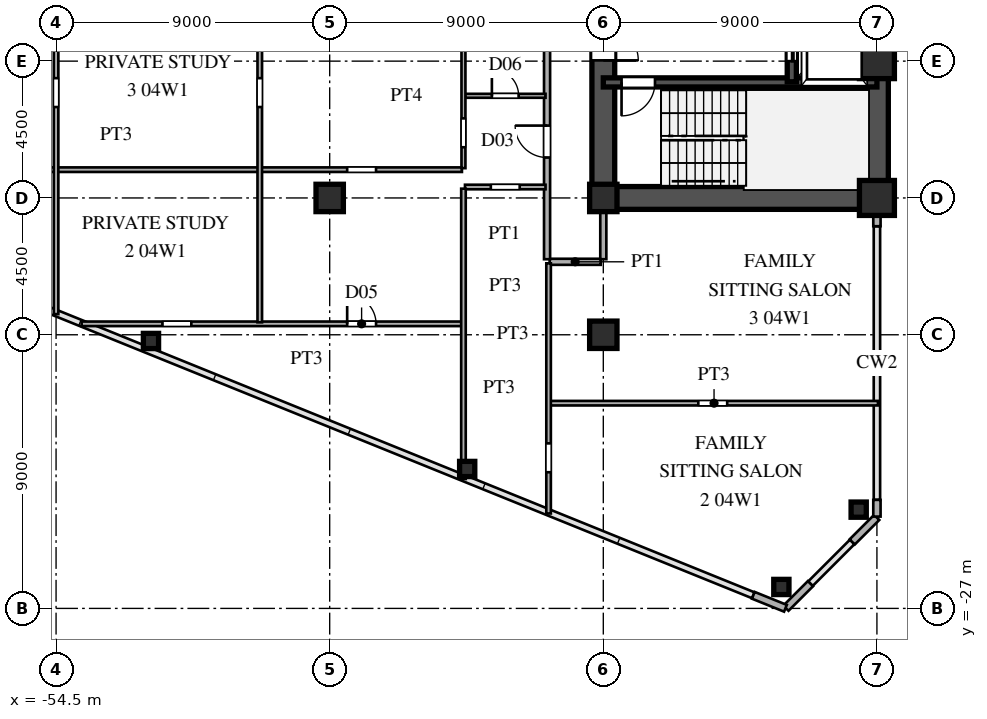
"""IFC4 building model, lengths in metres.
Left out: names, types, materials, properties, quantities, classifications, styles, units other than length and angle.
Written with IfcOpenShell. Run it as: python <this file> out.ifc"""

import sys

from ifc_helpers import new_model, si_unit, direction, frame, frame_2d, origin, origin_2d, place, context, subcontext, project, spatial, rectangle, hollow_rectangle, i_section, extrude, source, transform, mapped, element, fill, save


model = new_model("IFC4")
c1 = context("Model", 3, precision=1e-05, world=origin(), true_north=direction((0.0, 1.0)))
c2 = subcontext(c1, "Body", "Model", "MODEL_VIEW")
j1 = project(units=[si_unit("LENGTHUNIT", "METRE"), si_unit("PLANEANGLEUNIT", "RADIAN")], contexts=[c1])
p1 = place(None, origin())
s1 = spatial("IfcSite", under=j1, at=p1, CompositionType="ELEMENT")
p2 = place(p1, origin())
s2 = spatial("IfcBuilding", under=s1, at=p2, CompositionType="ELEMENT")
p3 = place(p2, frame((0.0, 0.0, 18.9)))
s3 = spatial("IfcBuildingStorey", under=s2, at=p3, CompositionType="ELEMENT", Elevation=18.9)
m1 = source(origin(), c2, "Body", "SweptSolid", [
    extrude(hollow_rectangle(XDim=1.15, YDim=1.15, WallThickness=0.048, at=origin_2d()), origin(), (0.0, 0.0, 1.0), 3.6),
])
for number, where, z_axis, x_axis in (
    (1, (-27.5, -13.5, 0.0), (0.0, 0.0, 1.0), (1.0, 0.0, 0.0)),
    (2, (-27.5, -9.0, 0.0), (0.0, 0.0, 1.0), (1.0, 0.0, 0.0)),
):
    element("IfcColumn", number, at=place(p3, frame(where, z_axis=z_axis, x_axis=x_axis)), inside=s3, PredefinedType="COLUMN", context=c2, shape_type="MappedRepresentation", body=[
        mapped(m1, transform((0.0, 0.0, 0.0), scale=1.0)),
    ])
m2 = source(origin(), c2, "Body", "SweptSolid", [
    extrude(i_section(OverallWidth=0.9, OverallDepth=0.9, WebThickness=0.036, FlangeThickness=0.055, at=origin_2d()), origin(), (0.0, 0.0, 1.0), 3.6),
])
for number, where, z_axis, x_axis in (
    (3, (-36.5, -18.0, 0.0), (0.0, 0.0, 1.0), (1.0, 0.0, 0.0)),
    (4, (-36.5, -13.5, 0.0), (0.0, 0.0, 1.0), (1.0, 0.0, 0.0)),
    (5, (-45.5, -13.5, 0.0), (0.0, 0.0, 1.0), (1.0, 0.0, 0.0)),
):
    element("IfcColumn", number, at=place(p3, frame(where, z_axis=z_axis, x_axis=x_axis)), inside=s3, PredefinedType="COLUMN", context=c2, shape_type="MappedRepresentation", body=[
        mapped(m2, transform((0.0, 0.0, 0.0), scale=1.0)),
    ])
m3 = source(origin(), c2, "Body", "SweptSolid", [
    extrude(hollow_rectangle(XDim=0.5, YDim=0.5, WallThickness=0.02, at=origin_2d()), origin(), (0.0, 0.0, 1.0), 3.6),
])
for number, where, z_axis, x_axis in (
    (6, (-28.1, -23.751, 0.0), (0.0, 0.0, 1.0), (1.0, 0.0, 0.0)),
    (7, (-30.643, -26.295, 0.0), (0.0, 0.0, 1.0), (1.0, 0.0, 0.0)),
    (8, (-40.977, -22.414, 0.0), (0.0, 0.0, 1.0), (1.0, 0.0, 0.0)),
    (9, (-51.378, -18.204, 0.0), (0.0, 0.0, 1.0), (1.0, 0.0, 0.0)),
):
    element("IfcColumn", number, at=place(p3, frame(where, z_axis=z_axis, x_axis=x_axis)), inside=s3, PredefinedType="COLUMN", context=c2, shape_type="MappedRepresentation", body=[
        mapped(m3, transform((0.0, 0.0, 0.0), scale=1.0)),
    ])
p4 = place(p3, frame((-27.5, -23.98, 0.0), z_axis=(0.0, 0.0, 1.0), x_axis=(0.0, 1.0, 0.0)))
e10 = element("IfcWall", 10, at=p4, inside=s3, PredefinedType="SOLIDWALL", context=c2, shape_type="SweptSolid", body=[
    extrude(rectangle(XDim=0.55, YDim=0.24, at=frame_2d((0.275, 0.0))), origin(), (0.0, 0.0, 1.0), 3.38),
])
p5 = place(p3, frame((-27.5, -14.43, 0.0), z_axis=(0.0, 0.0, 1.0), x_axis=(0.0, 1.0, 0.0)))
e11 = element("IfcWall", 11, at=p5, inside=s3, PredefinedType="SOLIDWALL", context=c2, shape_type="SweptSolid", body=[
    extrude(rectangle(XDim=0.55, YDim=0.24, at=frame_2d((0.275, 0.0))), origin(), (0.0, 0.0, 1.0), 2.88),
])
p6 = place(p3, frame((-31.566, -26.569, 0.0), z_axis=(0.0, 0.0, 1.0), x_axis=(0.927007103665, -0.375043770452, 0.0)))
e12 = element("IfcWall", 12, at=p6, inside=s3, PredefinedType="SOLIDWALL", context=c2, shape_type="SweptSolid", body=[
    extrude(rectangle(XDim=1.14, YDim=0.24, at=frame_2d((0.57, 0.0))), origin(), (0.0, 0.0, 1.0), 3.38),
])
for number, where, z_axis, x_axis in (
    (13, (-30.493, -26.993, 0.0), (0.0, 0.0, 1.0), (0.707, 0.707, 0.0)),
    (14, (-28.313, -24.813, 0.0), (0.0, 0.0, 1.0), (0.707, 0.707, 0.0)),
):
    element("IfcWall", number, at=place(p3, frame(where, z_axis=z_axis, x_axis=x_axis)), inside=s3, PredefinedType="SOLIDWALL", context=c2, shape_type="SweptSolid", body=[
        extrude(rectangle(XDim=1.14, YDim=0.24, at=frame_2d((0.57, 0.0))), origin(), (0.0, 0.0, 1.0), 3.38),
    ])
p7 = place(p3, frame((-27.5, -13.5, 0.0), z_axis=(0.0, 0.0, 1.0), x_axis=(0.0, 1.0, 0.0)))
e15 = element("IfcWall", 15, at=p7, inside=s3, PredefinedType="SHEAR", context=c2, shape_type="SweptSolid", body=[
    extrude(rectangle(XDim=12.2, YDim=0.75, at=frame_2d((6.1, 0.0))), origin(), (0.0, 0.0, 1.0), 3.38),
])
p8 = place(p3, frame((-36.5, -13.5, 0.0), z_axis=(0.0, 0.0, 1.0), x_axis=(1.0, 0.0, 0.0)))
e16 = element("IfcWall", 16, at=p8, inside=s3, PredefinedType="SHEAR", context=c2, shape_type="SweptSolid", body=[
    extrude(rectangle(XDim=9.0, YDim=0.75, at=frame_2d((4.5, 0.0))), origin(), (0.0, 0.0, 1.0), 3.38),
])
p9 = place(p3, frame((-36.5, -13.65, 0.0), z_axis=(0.0, 0.0, 1.0), x_axis=(0.0, 1.0, 0.0)))
e17 = element("IfcWall", 17, at=p9, inside=s3, PredefinedType="SHEAR", context=c2, shape_type="SweptSolid", body=[
    extrude(rectangle(XDim=7.15, YDim=0.75, at=frame_2d((3.575, 0.0))), origin(), (0.0, 0.0, 1.0), 3.38),
])
p10 = place(p9, frame((4.675, 0.0, 0.0)))
e18 = element("IfcOpeningElement", 18, at=p10, cuts=e17, PredefinedType="OPENING", context=c2, shape_type="SweptSolid", body=[
    extrude(rectangle(XDim=1.15, YDim=2.2, at=frame_2d((0.575, 1.1))), frame((0.0, 0.385, 0.0), z_axis=(0.0, -1.0, 0.0), x_axis=(1.0, 0.0, 0.0)), (0.0, 0.0, 1.0), 0.77),
])
p11 = place(p3, frame((-36.5, -9.7, 0.0), z_axis=(0.0, 0.0, 1.0), x_axis=(1.0, 0.0, 0.0)))
e19 = element("IfcWall", 19, at=p11, inside=s3, PredefinedType="SHEAR", context=c2, shape_type="SweptSolid", body=[
    extrude(rectangle(XDim=9.0, YDim=0.3, at=frame_2d((4.5, 0.0))), origin(), (0.0, 0.0, 1.0), 3.38),
])
p12 = place(p11, frame((0.6, 0.0, 0.0)))
e20 = element("IfcOpeningElement", 20, at=p12, cuts=e19, PredefinedType="OPENING", context=c2, shape_type="SweptSolid", body=[
    extrude(rectangle(XDim=1.1, YDim=2.2, at=frame_2d((0.55, 1.1))), frame((0.0, 0.16, 0.0), z_axis=(0.0, -1.0, 0.0), x_axis=(1.0, 0.0, 0.0)), (0.0, 0.0, 1.0), 0.32),
])
p13 = place(p3, frame((-30.3, -9.68, 0.0), z_axis=(0.0, 0.0, 1.0), x_axis=(0.0, 1.0, 0.0)))
e21 = element("IfcWall", 21, at=p13, inside=s3, PredefinedType="SHEAR", context=c2, shape_type="SweptSolid", body=[
    extrude(rectangle(XDim=2.56, YDim=0.3, at=frame_2d((1.28, 0.0))), origin(), (0.0, 0.0, 1.0), 3.38),
])
p14 = place(p13, frame((0.68, 0.0, 0.0)))
e22 = element("IfcOpeningElement", 22, at=p14, cuts=e21, PredefinedType="OPENING", context=c2, shape_type="SweptSolid", body=[
    extrude(rectangle(XDim=1.2, YDim=2.25, at=frame_2d((0.6, 1.125))), frame((0.0, 0.16, 0.0), z_axis=(0.0, -1.0, 0.0), x_axis=(1.0, 0.0, 0.0)), (0.0, 0.0, 1.0), 0.32),
])
p15 = place(p3, frame((-38.25, -20.25, 0.0), z_axis=(0.0, 0.0, 1.0), x_axis=(1.0, 0.0, 0.0)))
e23 = element("IfcWall", 23, at=p15, inside=s3, PredefinedType="PARTITIONING", context=c2, shape_type="SweptSolid", body=[
    extrude(rectangle(XDim=10.785, YDim=0.15, at=frame_2d((5.393, 0.0))), origin(), (0.0, 0.0, 1.0), 3.38),
])
p16 = place(p15, frame((4.875, 0.0, 0.0)))
e24 = element("IfcOpeningElement", 24, at=p16, cuts=e23, PredefinedType="OPENING", context=c2, shape_type="SweptSolid", body=[
    extrude(rectangle(XDim=0.95, YDim=2.15, at=frame_2d((0.475, 1.075))), frame((0.0, 0.085, 0.0), z_axis=(0.0, -1.0, 0.0), x_axis=(1.0, 0.0, 0.0)), (0.0, 0.0, 1.0), 0.17),
])
p17 = place(p3, frame((-53.66, -17.64, 0.0), z_axis=(0.0, 0.0, 1.0), x_axis=(1.0, 0.0, 0.0)))
e25 = element("IfcWall", 25, at=p17, inside=s3, PredefinedType="PARTITIONING", context=c2, shape_type="SweptSolid", body=[
    extrude(rectangle(XDim=12.51, YDim=0.15, at=frame_2d((6.255, 0.0))), origin(), (0.0, 0.0, 1.0), 3.38),
])
p18 = place(p17, frame((8.735, 0.0, 0.0)))
e26 = element("IfcOpeningElement", 26, at=p18, cuts=e25, PredefinedType="OPENING", context=c2, shape_type="SweptSolid", body=[
    extrude(rectangle(XDim=0.95, YDim=2.15, at=frame_2d((0.475, 1.075))), frame((0.0, 0.085, 0.0), z_axis=(0.0, -1.0, 0.0), x_axis=(1.0, 0.0, 0.0)), (0.0, 0.0, 1.0), 0.17),
])
p19 = place(p17, frame((2.659, 0.0, 0.0)))
e27 = element("IfcOpeningElement", 27, at=p19, cuts=e25, PredefinedType="OPENING", context=c2, shape_type="SweptSolid", body=[
    extrude(rectangle(XDim=0.95, YDim=2.15, at=frame_2d((0.475, 1.075))), frame((0.0, 0.085, 0.0), z_axis=(0.0, -1.0, 0.0), x_axis=(1.0, 0.0, 0.0)), (0.0, 0.0, 1.0), 0.17),
])
p20 = place(p3, frame((-38.265, -15.6, 0.0), z_axis=(0.0, 0.0, 1.0), x_axis=(1.0, 0.0, 0.0)))
e28 = element("IfcWall", 28, at=p20, inside=s3, PredefinedType="PARTITIONING", context=c2, shape_type="SweptSolid", body=[
    extrude(rectangle(XDim=1.68, YDim=0.2, at=frame_2d((0.84, 0.0))), origin(), (0.0, 0.0, 1.0), 3.38),
])
p21 = place(p3, frame((-41.05, -13.14, 0.0), z_axis=(0.0, 0.0, 1.0), x_axis=(1.0, 0.0, 0.0)))
e29 = element("IfcWall", 29, at=p21, inside=s3, PredefinedType="PARTITIONING", context=c2, shape_type="SweptSolid", body=[
    extrude(rectangle(XDim=2.65, YDim=0.15, at=frame_2d((1.325, 0.0))), origin(), (0.0, 0.0, 1.0), 3.38),
])
p22 = place(p21, frame((0.85, 0.0, 0.0)))
e30 = element("IfcOpeningElement", 30, at=p22, cuts=e29, PredefinedType="OPENING", context=c2, shape_type="SweptSolid", body=[
    extrude(rectangle(XDim=0.95, YDim=2.15, at=frame_2d((0.475, 1.075))), frame((0.0, 0.085, 0.0), z_axis=(0.0, -1.0, 0.0), x_axis=(1.0, 0.0, 0.0)), (0.0, 0.0, 1.0), 0.17),
])
p23 = place(p3, frame((-66.186, -12.57, 0.0), z_axis=(0.0, 0.0, 1.0), x_axis=(1.0, 0.0, 0.0)))
e31 = element("IfcWall", 31, at=p23, inside=s3, PredefinedType="PARTITIONING", context=c2, shape_type="SweptSolid", body=[
    extrude(rectangle(XDim=25.036, YDim=0.15, at=frame_2d((12.518, 0.0))), origin(), (0.0, 0.0, 1.0), 3.38),
])
p24 = place(p23, frame((21.261, 0.0, 0.0)))
e32 = element("IfcOpeningElement", 32, at=p24, cuts=e31, PredefinedType="OPENING", context=c2, shape_type="SweptSolid", body=[
    extrude(rectangle(XDim=0.95, YDim=2.15, at=frame_2d((0.475, 1.075))), frame((0.0, 0.085, 0.0), z_axis=(0.0, -1.0, 0.0), x_axis=(1.0, 0.0, 0.0)), (0.0, 0.0, 1.0), 0.17),
])
p25 = place(p23, frame((8.361, 0.0, 0.0)))
e33 = element("IfcOpeningElement", 33, at=p25, cuts=e31, PredefinedType="OPENING", context=c2, shape_type="SweptSolid", body=[
    extrude(rectangle(XDim=0.95, YDim=2.15, at=frame_2d((0.475, 1.075))), frame((0.0, 0.085, 0.0), z_axis=(0.0, -1.0, 0.0), x_axis=(1.0, 0.0, 0.0)), (0.0, 0.0, 1.0), 0.17),
])
p26 = place(p3, frame((-41.05, -10.14, 0.0), z_axis=(0.0, 0.0, 1.0), x_axis=(1.0, 0.0, 0.0)))
e34 = element("IfcWall", 34, at=p26, inside=s3, PredefinedType="PARTITIONING", context=c2, shape_type="SweptSolid", body=[
    extrude(rectangle(XDim=2.65, YDim=0.13, at=frame_2d((1.325, 0.0))), origin(), (0.0, 0.0, 1.0), 3.38),
])
p27 = place(p26, frame((0.885, 0.0, 0.0)))
e35 = element("IfcOpeningElement", 35, at=p27, cuts=e34, PredefinedType="OPENING", context=c2, shape_type="SweptSolid", body=[
    extrude(rectangle(XDim=0.88, YDim=2.1, at=frame_2d((0.44, 1.05))), frame((0.0, 0.075, 0.0), z_axis=(0.0, -1.0, 0.0), x_axis=(1.0, 0.0, 0.0)), (0.0, 0.0, 1.0), 0.15),
])
p28 = place(p3, frame((-54.5, -17.321, 0.0), z_axis=(0.0, 0.0, 1.0), x_axis=(0.0, 1.0, 0.0)))
e36 = element("IfcWall", 36, at=p28, inside=s3, PredefinedType="PARTITIONING", context=c2, shape_type="SweptSolid", body=[
    extrude(rectangle(XDim=34.557, YDim=0.15, at=frame_2d((17.279, 0.0))), origin(), (0.0, 0.0, 1.0), 2.68),
])
p29 = place(p28, frame((6.811, 0.0, 0.0)))
e37 = element("IfcOpeningElement", 37, at=p29, cuts=e36, PredefinedType="OPENING", context=c2, shape_type="SweptSolid", body=[
    extrude(rectangle(XDim=0.95, YDim=2.15, at=frame_2d((0.475, 1.075))), frame((0.0, 0.085, 0.0), z_axis=(0.0, -1.0, 0.0), x_axis=(1.0, 0.0, 0.0)), (0.0, 0.0, 1.0), 0.17),
])
p30 = place(p28, frame((16.346, 0.0, 0.0)))
e38 = element("IfcOpeningElement", 38, at=p30, cuts=e36, PredefinedType="OPENING", context=c2, shape_type="SweptSolid", body=[
    extrude(rectangle(XDim=0.95, YDim=2.15, at=frame_2d((0.475, 1.075))), frame((0.0, 0.085, 0.0), z_axis=(0.0, -1.0, 0.0), x_axis=(1.0, 0.0, 0.0)), (0.0, 0.0, 1.0), 0.17),
])
p31 = place(p28, frame((11.312, 0.0, 0.0)))
e39 = element("IfcOpeningElement", 39, at=p31, cuts=e36, PredefinedType="OPENING", context=c2, shape_type="SweptSolid", body=[
    extrude(rectangle(XDim=0.95, YDim=2.15, at=frame_2d((0.475, 1.075))), frame((0.0, 0.085, 0.0), z_axis=(0.0, -1.0, 0.0), x_axis=(1.0, 0.0, 0.0)), (0.0, 0.0, 1.0), 0.17),
])
p32 = place(p28, frame((20.352, 0.0, 0.0)))
e40 = element("IfcOpeningElement", 40, at=p32, cuts=e36, PredefinedType="OPENING", context=c2, shape_type="SweptSolid", body=[
    extrude(rectangle(XDim=0.95, YDim=2.15, at=frame_2d((0.475, 1.075))), frame((0.0, 0.085, 0.0), z_axis=(0.0, -1.0, 0.0), x_axis=(1.0, 0.0, 0.0)), (0.0, 0.0, 1.0), 0.17),
])
p33 = place(p28, frame((26.048, 0.0, 0.0)))
e41 = element("IfcOpeningElement", 41, at=p33, cuts=e36, PredefinedType="OPENING", context=c2, shape_type="SweptSolid", body=[
    extrude(rectangle(XDim=0.95, YDim=2.15, at=frame_2d((0.475, 1.075))), frame((0.0, 0.085, 0.0), z_axis=(0.0, -1.0, 0.0), x_axis=(1.0, 0.0, 0.0)), (0.0, 0.0, 1.0), 0.17),
])
p34 = place(p3, frame((-47.8, -17.59, 0.0), z_axis=(0.0, 0.0, 1.0), x_axis=(0.0, 1.0, 0.0)))
e42 = element("IfcWall", 42, at=p34, inside=s3, PredefinedType="PARTITIONING", context=c2, shape_type="SweptSolid", body=[
    extrude(rectangle(XDim=34.846, YDim=0.15, at=frame_2d((17.423, 0.0))), origin(), (0.0, 0.0, 1.0), 3.38),
])
p35 = place(p34, frame((7.08, 0.0, 0.0)))
e43 = element("IfcOpeningElement", 43, at=p35, cuts=e42, PredefinedType="OPENING", context=c2, shape_type="SweptSolid", body=[
    extrude(rectangle(XDim=0.95, YDim=2.15, at=frame_2d((0.475, 1.075))), frame((0.0, 0.085, 0.0), z_axis=(0.0, -1.0, 0.0), x_axis=(1.0, 0.0, 0.0)), (0.0, 0.0, 1.0), 0.17),
])
p36 = place(p34, frame((16.615, 0.0, 0.0)))
e44 = element("IfcOpeningElement", 44, at=p36, cuts=e42, PredefinedType="OPENING", context=c2, shape_type="SweptSolid", body=[
    extrude(rectangle(XDim=0.95, YDim=2.15, at=frame_2d((0.475, 1.075))), frame((0.0, 0.085, 0.0), z_axis=(0.0, -1.0, 0.0), x_axis=(1.0, 0.0, 0.0)), (0.0, 0.0, 1.0), 0.17),
])
p37 = place(p34, frame((26.317, 0.0, 0.0)))
e45 = element("IfcOpeningElement", 45, at=p37, cuts=e42, PredefinedType="OPENING", context=c2, shape_type="SweptSolid", body=[
    extrude(rectangle(XDim=0.95, YDim=2.15, at=frame_2d((0.475, 1.075))), frame((0.0, 0.085, 0.0), z_axis=(0.0, -1.0, 0.0), x_axis=(1.0, 0.0, 0.0)), (0.0, 0.0, 1.0), 0.17),
])
p38 = place(p3, frame((-41.1, -22.744, 0.0), z_axis=(0.0, 0.0, 1.0), x_axis=(0.0, 1.0, 0.0)))
e46 = element("IfcWall", 46, at=p38, inside=s3, PredefinedType="PARTITIONING", context=c2, shape_type="SweptSolid", body=[
    extrude(rectangle(XDim=9.549, YDim=0.15, at=frame_2d((4.774, 0.0))), origin(), (0.0, 0.0, 1.0), 3.38),
])
p39 = place(p3, frame((-41.1, -12.52, 0.0), z_axis=(0.0, 0.0, 1.0), x_axis=(0.0, 1.0, 0.0)))
e47 = element("IfcWall", 47, at=p39, inside=s3, PredefinedType="PARTITIONING", context=c2, shape_type="SweptSolid", body=[
    extrude(rectangle(XDim=14.303, YDim=0.13, at=frame_2d((7.151, 0.0))), origin(), (0.0, 0.0, 1.0), 3.38),
])
p40 = place(p39, frame((0.688, 0.0, 0.0)))
e48 = element("IfcOpeningElement", 48, at=p40, cuts=e47, PredefinedType="OPENING", context=c2, shape_type="SweptSolid", body=[
    extrude(rectangle(XDim=0.95, YDim=2.15, at=frame_2d((0.475, 1.075))), frame((0.0, 0.075, 0.0), z_axis=(0.0, -1.0, 0.0), x_axis=(1.0, 0.0, 0.0)), (0.0, 0.0, 1.0), 0.15),
])
p41 = place(p39, frame((11.545, 0.0, 0.0)))
e49 = element("IfcOpeningElement", 49, at=p41, cuts=e47, PredefinedType="OPENING", context=c2, shape_type="SweptSolid", body=[
    extrude(rectangle(XDim=0.95, YDim=2.15, at=frame_2d((0.475, 1.075))), frame((0.0, 0.075, 0.0), z_axis=(0.0, -1.0, 0.0), x_axis=(1.0, 0.0, 0.0)), (0.0, 0.0, 1.0), 0.15),
])
p42 = place(p3, frame((-38.35, -15.515, 0.0), z_axis=(0.0, 0.0, 1.0), x_axis=(0.0, 1.0, 0.0)))
e50 = element("IfcWall", 50, at=p42, inside=s3, PredefinedType="PARTITIONING", context=c2, shape_type="SweptSolid", body=[
    extrude(rectangle(XDim=31.03, YDim=0.2, at=frame_2d((15.515, 0.0))), origin(), (0.0, 0.0, 1.0), 3.38),
])
p43 = place(p42, frame((3.345, 0.0, 0.0)))
e51 = element("IfcOpeningElement", 51, at=p43, cuts=e50, PredefinedType="OPENING", context=c2, shape_type="SweptSolid", body=[
    extrude(rectangle(XDim=1.05, YDim=2.25, at=frame_2d((0.525, 1.125))), frame((0.0, 0.11, 0.0), z_axis=(0.0, -1.0, 0.0), x_axis=(1.0, 0.0, 0.0)), (0.0, 0.0, 1.0), 0.22),
])
p44 = place(p42, frame((14.28, 0.0, 0.0)))
e52 = element("IfcOpeningElement", 52, at=p44, cuts=e50, PredefinedType="OPENING", context=c2, shape_type="SweptSolid", body=[
    extrude(rectangle(XDim=1.05, YDim=2.25, at=frame_2d((0.525, 1.125))), frame((0.0, 0.11, 0.0), z_axis=(0.0, -1.0, 0.0), x_axis=(1.0, 0.0, 0.0)), (0.0, 0.0, 1.0), 0.22),
])
p45 = place(p42, frame((26.067, 0.0, 0.0)))
e53 = element("IfcOpeningElement", 53, at=p45, cuts=e50, PredefinedType="OPENING", context=c2, shape_type="SweptSolid", body=[
    extrude(rectangle(XDim=1.05, YDim=2.25, at=frame_2d((0.525, 1.125))), frame((0.0, 0.11, 0.0), z_axis=(0.0, -1.0, 0.0), x_axis=(1.0, 0.0, 0.0)), (0.0, 0.0, 1.0), 0.22),
])
p46 = place(p3, frame((-38.3, -23.878, 0.0), z_axis=(0.0, 0.0, 1.0), x_axis=(0.0, 1.0, 0.0)))
e54 = element("IfcWall", 54, at=p46, inside=s3, PredefinedType="PARTITIONING", context=c2, shape_type="SweptSolid", body=[
    extrude(rectangle(XDim=8.228, YDim=0.15, at=frame_2d((4.114, 0.0))), origin(), (0.0, 0.0, 1.0), 3.38),
])
p47 = place(p46, frame((1.357, 0.0, 0.0)))
e55 = element("IfcOpeningElement", 55, at=p47, cuts=e54, PredefinedType="OPENING", context=c2, shape_type="SweptSolid", body=[
    extrude(rectangle(XDim=0.95, YDim=2.15, at=frame_2d((0.475, 1.075))), frame((0.0, 0.085, 0.0), z_axis=(0.0, -1.0, 0.0), x_axis=(1.0, 0.0, 0.0)), (0.0, 0.0, 1.0), 0.17),
])
p48 = place(p3, frame((-36.5, -15.515, 0.0), z_axis=(0.0, 0.0, 1.0), x_axis=(0.0, 1.0, 0.0)))
e56 = element("IfcWall", 56, at=p48, inside=s3, PredefinedType="PARTITIONING", context=c2, shape_type="SweptSolid", body=[
    extrude(rectangle(XDim=1.635, YDim=0.2, at=frame_2d((0.817, 0.0))), origin(), (0.0, 0.0, 1.0), 2.68),
])
m4 = source(origin(), c2, "Body", "SweptSolid", [
    extrude(rectangle(XDim=1.15, YDim=2.2, at=frame_2d((0.575, 1.1))), frame((0.0, 0.025, 0.0), z_axis=(0.0, -1.0, 0.0), x_axis=(1.0, 0.0, 0.0)), (0.0, 0.0, 1.0), 0.05),
])
p49 = place(p10, frame((1.15, 0.0, 0.0), z_axis=(0.0, 0.0, 1.0), x_axis=(-1.0, 0.0, 0.0)))
e57 = element("IfcDoor", 57, at=p49, inside=s3, OperationType="SINGLE_SWING_LEFT", PredefinedType="DOOR", context=c2, shape_type="MappedRepresentation", body=[
    mapped(m4, transform((0.0, 0.0, 0.0), scale=1.0)),
])
fill(e18, e57)
m5 = source(origin(), c2, "Body", "SweptSolid", [
    extrude(rectangle(XDim=1.1, YDim=2.2, at=frame_2d((0.55, 1.1))), frame((0.0, 0.025, 0.0), z_axis=(0.0, -1.0, 0.0), x_axis=(1.0, 0.0, 0.0)), (0.0, 0.0, 1.0), 0.05),
])
p50 = place(p12, frame((1.1, 0.0, 0.0), z_axis=(0.0, 0.0, 1.0), x_axis=(-1.0, 0.0, 0.0)))
e58 = element("IfcDoor", 58, at=p50, inside=s3, OperationType="SINGLE_SWING_LEFT", PredefinedType="DOOR", context=c2, shape_type="MappedRepresentation", body=[
    mapped(m5, transform((0.0, 0.0, 0.0), scale=1.0)),
])
fill(e20, e58)
m6 = source(origin(), c2, "Body", "SweptSolid", [
    extrude(rectangle(XDim=1.2, YDim=2.25, at=frame_2d((0.6, 1.125))), frame((0.0, 0.025, 0.0), z_axis=(0.0, -1.0, 0.0), x_axis=(1.0, 0.0, 0.0)), (0.0, 0.0, 1.0), 0.05),
])
p51 = place(p14, origin())
e59 = element("IfcDoor", 59, at=p51, inside=s3, OperationType="DOUBLE_DOOR_SLIDING", PredefinedType="DOOR", context=c2, shape_type="MappedRepresentation", body=[
    mapped(m6, transform((0.0, 0.0, 0.0), scale=1.0)),
])
fill(e22, e59)
m7 = source(origin(), c2, "Body", "SweptSolid", [
    extrude(rectangle(XDim=0.95, YDim=2.15, at=frame_2d((0.475, 1.075))), frame((0.0, 0.025, 0.0), z_axis=(0.0, -1.0, 0.0), x_axis=(1.0, 0.0, 0.0)), (0.0, 0.0, 1.0), 0.05),
])
p52 = place(p18, origin())
e60 = element("IfcDoor", 60, at=p52, inside=s3, OperationType="SINGLE_SWING_LEFT", PredefinedType="DOOR", context=c2, shape_type="MappedRepresentation", body=[
    mapped(m7, transform((0.0, 0.0, 0.0), scale=1.0)),
])
fill(e26, e60)
m8 = source(origin(), c2, "Body", "SweptSolid", [
    extrude(rectangle(XDim=0.88, YDim=2.1, at=frame_2d((0.44, 1.05))), frame((0.0, 0.025, 0.0), z_axis=(0.0, -1.0, 0.0), x_axis=(1.0, 0.0, 0.0)), (0.0, 0.0, 1.0), 0.05),
])
p53 = place(p27, origin())
e61 = element("IfcDoor", 61, at=p53, inside=s3, OperationType="SINGLE_SWING_LEFT", PredefinedType="DOOR", context=c2, shape_type="MappedRepresentation", body=[
    mapped(m8, transform((0.0, 0.0, 0.0), scale=1.0)),
])
fill(e35, e61)
m9 = source(origin(), c2, "Body", "SweptSolid", [
    extrude(rectangle(XDim=1.05, YDim=2.25, at=frame_2d((0.525, 1.125))), frame((0.0, 0.025, 0.0), z_axis=(0.0, -1.0, 0.0), x_axis=(1.0, 0.0, 0.0)), (0.0, 0.0, 1.0), 0.05),
])
p54 = place(p43, origin())
e62 = element("IfcDoor", 62, at=p54, inside=s3, OperationType="SINGLE_SWING_RIGHT", PredefinedType="DOOR", context=c2, shape_type="MappedRepresentation", body=[
    mapped(m9, transform((0.0, 0.0, 0.0), scale=1.0)),
])
fill(e51, e62)
save(model, sys.argv[1])
